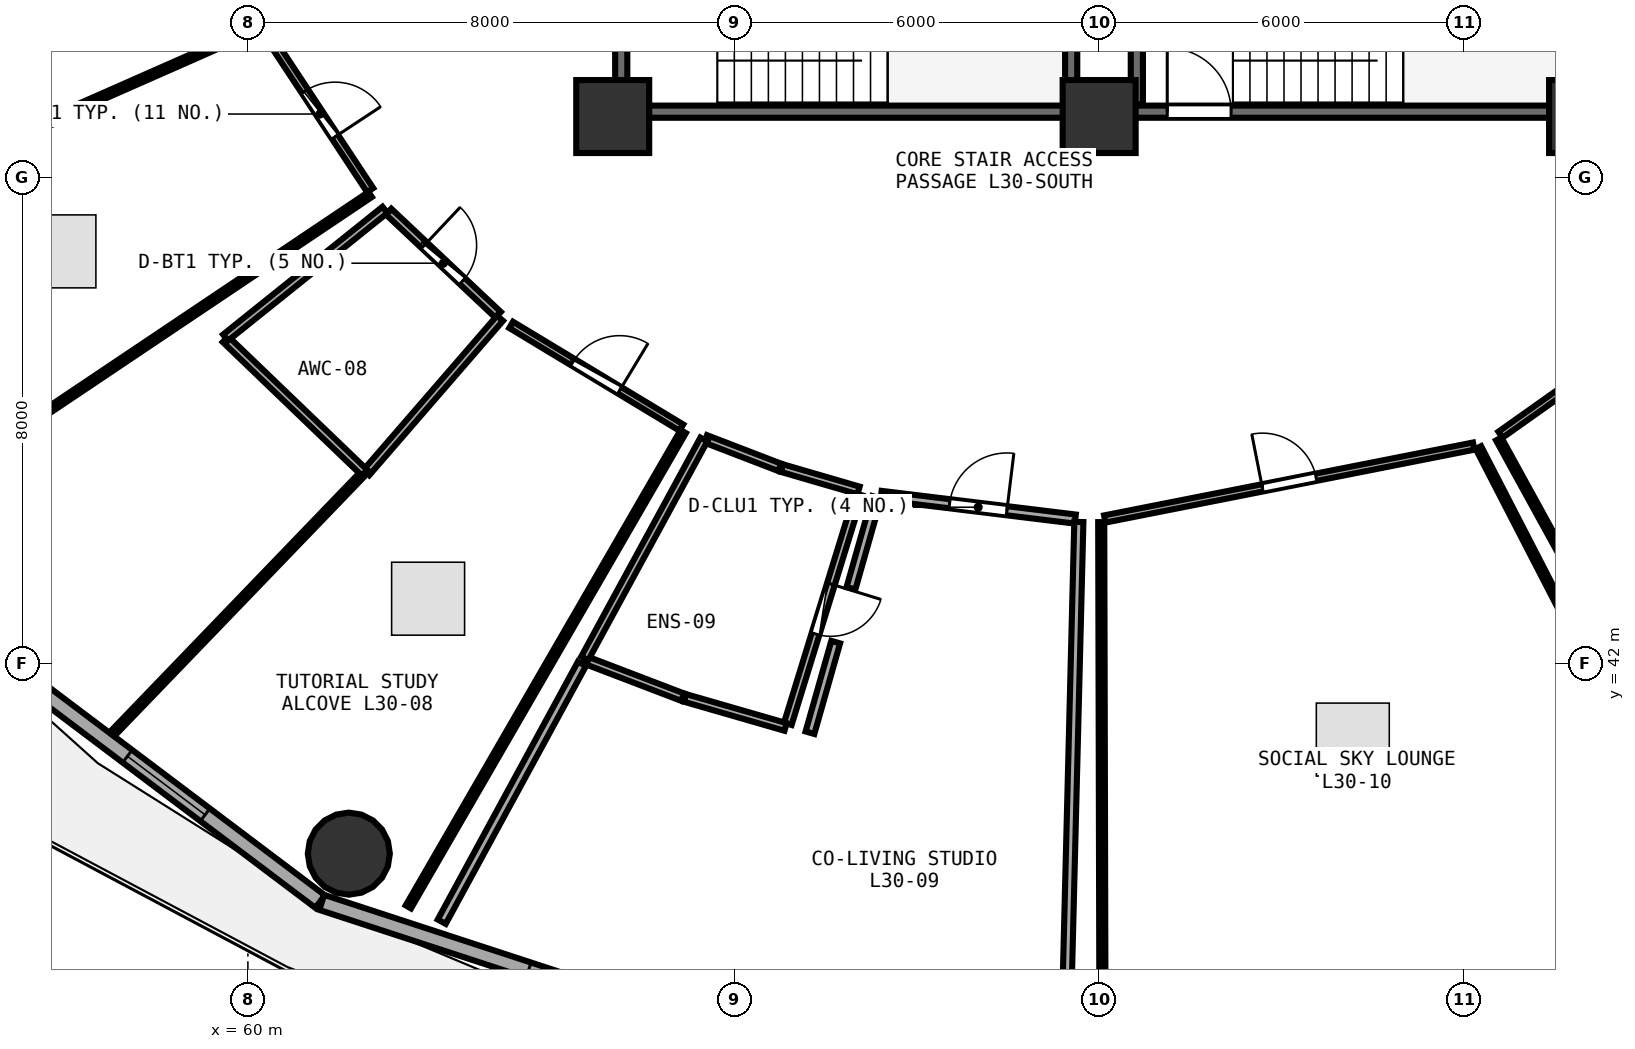
"""IFC4 building model, lengths in metres.
Left out: names, types, materials, properties, quantities, classifications, styles, units other than length and angle.
Written with IfcOpenShell. Run it as: python <this file> out.ifc"""

import sys

from ifc_helpers import new_model, si_unit, direction, frame, frame_2d, origin, origin_2d, place, context, subcontext, project, spatial, rectangle, circle, extrude, element, fill, save


model = new_model("IFC4")
c1 = context("Model", 3, precision=1e-05, world=origin(), true_north=direction((0.0, 1.0)))
c2 = subcontext(c1, "Body", "Model", "MODEL_VIEW")
j1 = project(units=[si_unit("LENGTHUNIT", "METRE"), si_unit("PLANEANGLEUNIT", "RADIAN")], contexts=[c1])
p1 = place(None, origin())
s1 = spatial("IfcSite", under=j1, at=p1, CompositionType="ELEMENT")
p2 = place(p1, origin())
s2 = spatial("IfcBuilding", under=s1, at=p2, CompositionType="ELEMENT")
p3 = place(p2, frame((0.0, 0.0, 117.6)))
s3 = spatial("IfcBuildingStorey", under=s2, at=p3, CompositionType="ELEMENT", Elevation=117.6)
for number, where, z_axis, x_axis in (
    (1, (66.0, 51.0, 0.0), (0.0, 0.0, 1.0), (1.0, 0.0, 0.0)),
    (2, (74.0, 51.0, 0.0), (0.0, 0.0, 1.0), (1.0, 0.0, 0.0)),
    (3, (82.0, 51.0, 0.0), (0.0, 0.0, 1.0), (1.0, 0.0, 0.0)),
):
    element("IfcColumn", number, at=place(p3, frame(where, z_axis=z_axis, x_axis=x_axis)), inside=s3, PredefinedType="PILASTER", context=c2, shape_type="SweptSolid", body=[
        extrude(rectangle(XDim=1.2, YDim=1.2, at=origin_2d()), origin(), (0.0, 0.0, 1.0), 3.75),
    ])
p4 = place(p3, frame((61.66, 38.878, 0.0), z_axis=(0.0, 0.0, 1.0), x_axis=(1.0, 0.0, 0.0)))
e4 = element("IfcColumn", 4, at=p4, inside=s3, PredefinedType="COLUMN", context=c2, shape_type="SweptSolid", body=[
    extrude(circle(Radius=0.675, at=origin_2d()), origin(), (0.0, 0.0, 1.0), 3.75),
])
p5 = place(p3, frame((54.401, 43.207, 0.0), z_axis=(0.0, 0.0, 1.0), x_axis=(0.798501507879, -0.601992808857, 0.0)))
e5 = element("IfcWall", 5, at=p5, inside=s3, PredefinedType="SOLIDWALL", context=c2, shape_type="SweptSolid", body=[
    extrude(rectangle(XDim=8.499, YDim=0.26, at=frame_2d((4.25, 0.0))), origin(), (0.0, 0.0, 1.0), 3.475),
])
p6 = place(p5, frame((4.53, 0.0, 0.85)))
e6 = element("IfcOpeningElement", 6, at=p6, cuts=e5, PredefinedType="OPENING", context=c2, shape_type="SweptSolid", body=[
    extrude(rectangle(XDim=1.6, YDim=1.45, at=frame_2d((0.8, 0.725))), frame((0.0, 0.14, 0.0), z_axis=(0.0, -1.0, 0.0), x_axis=(1.0, 0.0, 0.0)), (0.0, 0.0, 1.0), 0.28),
])
p7 = place(p3, frame((61.214, 38.077, 0.0), z_axis=(0.0, 0.0, 1.0), x_axis=(0.950471101963, -0.310812941064, 0.0)))
e7 = element("IfcWall", 7, at=p7, inside=s3, PredefinedType="SOLIDWALL", context=c2, shape_type="SweptSolid", body=[
    extrude(rectangle(XDim=8.76, YDim=0.26, at=frame_2d((4.38, 0.0))), origin(), (0.0, 0.0, 1.0), 3.475),
])
p8 = place(p7, frame((3.58, 0.0, 0.85)))
e8 = element("IfcOpeningElement", 8, at=p8, cuts=e7, PredefinedType="OPENING", context=c2, shape_type="SweptSolid", body=[
    extrude(rectangle(XDim=1.6, YDim=1.45, at=frame_2d((0.8, 0.725))), frame((0.0, 0.14, 0.0), z_axis=(0.0, -1.0, 0.0), x_axis=(1.0, 0.0, 0.0)), (0.0, 0.0, 1.0), 0.28),
])
p9 = place(p3, frame((74.0, 51.08, 0.0), z_axis=(0.0, 0.0, 1.0), x_axis=(1.0, 0.0, 0.0)))
e9 = element("IfcWall", 9, at=p9, inside=s3, PredefinedType="SHEAR", context=c2, shape_type="SweptSolid", body=[
    extrude(rectangle(XDim=7.9, YDim=0.2, at=frame_2d((3.95, 0.0))), origin(), (0.0, 0.0, 1.0), 3.49),
])
p10 = place(p9, frame((1.12, 0.0, 0.0)))
e10 = element("IfcOpeningElement", 10, at=p10, cuts=e9, PredefinedType="OPENING", context=c2, shape_type="SweptSolid", body=[
    extrude(rectangle(XDim=1.05, YDim=2.1, at=frame_2d((0.525, 1.05))), frame((0.0, 0.11, 0.0), z_axis=(0.0, -1.0, 0.0), x_axis=(1.0, 0.0, 0.0)), (0.0, 0.0, 1.0), 0.22),
])
p11 = place(p3, frame((74.62, 54.27, 0.0), z_axis=(0.0, 0.0, 1.0), x_axis=(0.0, -1.0, 0.0)))
e11 = element("IfcWall", 11, at=p11, inside=s3, PredefinedType="SHEAR", context=c2, shape_type="SweptSolid", body=[
    extrude(rectangle(XDim=3.07, YDim=0.2, at=frame_2d((1.535, 0.0))), origin(), (0.0, 0.0, 1.0), 3.49),
])
p12 = place(p3, frame((66.26, 51.08, 0.0), z_axis=(0.0, 0.0, 1.0), x_axis=(1.0, 0.0, 0.0)))
e12 = element("IfcWall", 12, at=p12, inside=s3, PredefinedType="SHEAR", context=c2, shape_type="SweptSolid", body=[
    extrude(rectangle(XDim=7.16, YDim=0.2, at=frame_2d((3.58, 0.0))), origin(), (0.0, 0.0, 1.0), 3.49),
])
p13 = place(p3, frame((73.54, 51.2, 0.0), z_axis=(0.0, 0.0, 1.0), x_axis=(0.0, 1.0, 0.0)))
e13 = element("IfcWall", 13, at=p13, inside=s3, PredefinedType="SHEAR", context=c2, shape_type="SweptSolid", body=[
    extrude(rectangle(XDim=3.07, YDim=0.2, at=frame_2d((1.535, 0.0))), origin(), (0.0, 0.0, 1.0), 3.49),
])
p14 = place(p3, frame((66.14, 54.27, 0.0), z_axis=(0.0, 0.0, 1.0), x_axis=(0.0, -1.0, 0.0)))
e14 = element("IfcWall", 14, at=p14, inside=s3, PredefinedType="SHEAR", context=c2, shape_type="SweptSolid", body=[
    extrude(rectangle(XDim=3.07, YDim=0.2, at=frame_2d((1.535, 0.0))), origin(), (0.0, 0.0, 1.0), 3.49),
])
p15 = place(p14, frame((1.01, 0.0, 0.0)))
e15 = element("IfcOpeningElement", 15, at=p15, cuts=e14, PredefinedType="OPENING", context=c2, shape_type="SweptSolid", body=[
    extrude(rectangle(XDim=1.05, YDim=2.1, at=frame_2d((0.525, 1.05))), frame((0.0, 0.11, 0.0), z_axis=(0.0, -1.0, 0.0), x_axis=(1.0, 0.0, 0.0)), (0.0, 0.0, 1.0), 0.22),
])
p16 = place(p3, frame((60.358, 52.293, 0.0), z_axis=(0.0, 0.0, 1.0), x_axis=(0.551050840628, -0.834471671804, 0.0)))
e16 = element("IfcWall", 16, at=p16, inside=s3, PredefinedType="PARTITIONING", context=c2, shape_type="SweptSolid", body=[
    extrude(rectangle(XDim=3.0, YDim=0.12, at=frame_2d((1.5, 0.0))), origin(), (0.0, 0.0, 1.0), 2.925),
])
p17 = place(p16, frame((1.05, 0.0, 0.0)))
e17 = element("IfcOpeningElement", 17, at=p17, cuts=e16, PredefinedType="OPENING", context=c2, shape_type="SweptSolid", body=[
    extrude(rectangle(XDim=0.9, YDim=2.08, at=frame_2d((0.45, 1.04))), frame((0.0, 0.07, 0.0), z_axis=(0.0, -1.0, 0.0), x_axis=(1.0, 0.0, 0.0)), (0.0, 0.0, 1.0), 0.14),
])
p18 = place(p3, frame((62.314, 49.437, 0.0), z_axis=(0.0, 0.0, 1.0), x_axis=(0.727704720547, -0.68589054498, 0.0)))
e18 = element("IfcWall", 18, at=p18, inside=s3, PredefinedType="PLUMBINGWALL", context=c2, shape_type="SweptSolid", body=[
    extrude(rectangle(XDim=2.476, YDim=0.13, at=frame_2d((1.238, 0.0))), origin(), (0.0, 0.0, 1.0), 2.925),
])
p19 = place(p18, frame((0.808, 0.0, 0.0)))
e19 = element("IfcOpeningElement", 19, at=p19, cuts=e18, PredefinedType="OPENING", context=c2, shape_type="SweptSolid", body=[
    extrude(rectangle(XDim=0.86, YDim=2.05, at=frame_2d((0.43, 1.025))), frame((0.0, 0.075, 0.0), z_axis=(0.0, -1.0, 0.0), x_axis=(1.0, 0.0, 0.0)), (0.0, 0.0, 1.0), 0.15),
])
p20 = place(p3, frame((64.329, 47.574, 0.0), z_axis=(0.0, 0.0, 1.0), x_axis=(0.8562252486, -0.516602674848, 0.0)))
e20 = element("IfcWall", 20, at=p20, inside=s3, PredefinedType="PARTITIONING", context=c2, shape_type="SweptSolid", body=[
    extrude(rectangle(XDim=3.269, YDim=0.12, at=frame_2d((1.635, 0.0))), origin(), (0.0, 0.0, 1.0), 2.925),
])
p21 = place(p20, frame((1.185, 0.0, 0.0)))
e21 = element("IfcOpeningElement", 21, at=p21, cuts=e20, PredefinedType="OPENING", context=c2, shape_type="SweptSolid", body=[
    extrude(rectangle(XDim=0.9, YDim=2.08, at=frame_2d((0.45, 1.04))), frame((0.0, 0.07, 0.0), z_axis=(0.0, -1.0, 0.0), x_axis=(1.0, 0.0, 0.0)), (0.0, 0.0, 1.0), 0.14),
])
p22 = place(p3, frame((70.044, 44.789, 0.0), z_axis=(0.0, 0.0, 1.0), x_axis=(-0.294737077858, -0.955578387646, 0.0)))
e22 = element("IfcWall", 22, at=p22, inside=s3, PredefinedType="PLUMBINGWALL", context=c2, shape_type="SweptSolid", body=[
    extrude(rectangle(XDim=3.951, YDim=0.13, at=frame_2d((1.976, 0.0))), origin(), (0.0, 0.0, 1.0), 3.175),
])
p23 = place(p22, frame((1.545, 0.0, 0.0)))
e23 = element("IfcOpeningElement", 23, at=p23, cuts=e22, PredefinedType="OPENING", context=c2, shape_type="SweptSolid", body=[
    extrude(rectangle(XDim=0.86, YDim=2.05, at=frame_2d((0.43, 1.025))), frame((0.0, 0.075, 0.0), z_axis=(0.0, -1.0, 0.0), x_axis=(1.0, 0.0, 0.0)), (0.0, 0.0, 1.0), 0.15),
])
p24 = place(p3, frame((70.414, 44.77, 0.0), z_axis=(0.0, 0.0, 1.0), x_axis=(0.992649213004, -0.12102702146, 0.0)))
e24 = element("IfcWall", 24, at=p24, inside=s3, PredefinedType="PARTITIONING", context=c2, shape_type="SweptSolid", body=[
    extrude(rectangle(XDim=3.218, YDim=0.15, at=frame_2d((1.609, 0.0))), origin(), (0.0, 0.0, 1.0), 3.48),
])
p25 = place(p24, frame((1.134, 0.0, 0.0)))
e25 = element("IfcOpeningElement", 25, at=p25, cuts=e24, PredefinedType="OPENING", context=c2, shape_type="SweptSolid", body=[
    extrude(rectangle(XDim=0.95, YDim=2.08, at=frame_2d((0.475, 1.04))), frame((0.0, 0.085, 0.0), z_axis=(0.0, -1.0, 0.0), x_axis=(1.0, 0.0, 0.0)), (0.0, 0.0, 1.0), 0.17),
])
p26 = place(p3, frame((74.093, 44.382, 0.0), z_axis=(0.0, 0.0, 1.0), x_axis=(0.981035031673, 0.193830510061, 0.0)))
e26 = element("IfcWall", 26, at=p26, inside=s3, PredefinedType="PARTITIONING", context=c2, shape_type="SweptSolid", body=[
    extrude(rectangle(XDim=6.184, YDim=0.12, at=frame_2d((3.092, 0.0))), origin(), (0.0, 0.0, 1.0), 3.235),
])
p27 = place(p26, frame((2.642, 0.0, 0.0)))
e27 = element("IfcOpeningElement", 27, at=p27, cuts=e26, PredefinedType="OPENING", context=c2, shape_type="SweptSolid", body=[
    extrude(rectangle(XDim=0.9, YDim=2.08, at=frame_2d((0.45, 1.04))), frame((0.0, 0.07, 0.0), z_axis=(0.0, -1.0, 0.0), x_axis=(1.0, 0.0, 0.0)), (0.0, 0.0, 1.0), 0.14),
])
p28 = place(p3, frame((80.601, 45.768, 0.0), z_axis=(0.0, 0.0, 1.0), x_axis=(0.815932399176, 0.578147316846, 0.0)))
e28 = element("IfcWall", 28, at=p28, inside=s3, PredefinedType="PARTITIONING", context=c2, shape_type="SweptSolid", body=[
    extrude(rectangle(XDim=5.993, YDim=0.12, at=frame_2d((2.997, 0.0))), origin(), (0.0, 0.0, 1.0), 2.925),
])
p29 = place(p28, frame((2.546, 0.0, 0.0)))
e29 = element("IfcOpeningElement", 29, at=p29, cuts=e28, PredefinedType="OPENING", context=c2, shape_type="SweptSolid", body=[
    extrude(rectangle(XDim=0.9, YDim=2.08, at=frame_2d((0.45, 1.04))), frame((0.0, 0.07, 0.0), z_axis=(0.0, -1.0, 0.0), x_axis=(1.0, 0.0, 0.0)), (0.0, 0.0, 1.0), 0.14),
])
p30 = place(p3, frame((60.213, 52.479, 0.0), z_axis=(0.0, 0.0, 1.0), x_axis=(-0.914847920866, -0.403798565732, 0.0)))
e30 = element("IfcWall", 30, at=p30, inside=s3, PredefinedType="PARTITIONING", context=c2, shape_type="SweptSolid", body=[
    extrude(rectangle(XDim=3.719, YDim=0.1, at=frame_2d((1.86, 0.0))), origin(), (0.0, 0.0, 1.0), 3.175),
])
p31 = place(p3, frame((56.76, 50.999, 0.0), z_axis=(0.0, 0.0, 1.0), x_axis=(-0.338198726163, 0.94107471628, 0.0)))
e31 = element("IfcWall", 31, at=p31, inside=s3, PredefinedType="PARTITIONING", context=c2, shape_type="SweptSolid", body=[
    extrude(rectangle(XDim=3.238, YDim=0.1, at=frame_2d((1.619, 0.0))), origin(), (0.0, 0.0, 1.0), 3.175),
])
p32 = place(p3, frame((62.011, 49.718, 0.0), z_axis=(0.0, 0.0, 1.0), x_axis=(-0.830433607217, -0.557117603388, 0.0)))
e32 = element("IfcWall", 32, at=p32, inside=s3, PredefinedType="PARTITIONING", context=c2, shape_type="SweptSolid", body=[
    extrude(rectangle(XDim=9.546, YDim=0.1, at=frame_2d((4.773, 0.0))), origin(), (0.0, 0.0, 1.0), 2.975),
])
p33 = place(p3, frame((51.219, 48.685, 0.0), z_axis=(0.0, 0.0, 1.0), x_axis=(0.927926926295, 0.372762148637, 0.0)))
e33 = element("IfcWall", 33, at=p33, inside=s3, PredefinedType="PARTITIONING", context=c2, shape_type="SweptSolid", body=[
    extrude(rectangle(XDim=6.044, YDim=0.1, at=frame_2d((3.022, 0.0))), origin(), (0.0, 0.0, 1.0), 2.925),
])
p34 = place(p3, frame((64.146, 47.683, 0.0), z_axis=(0.0, 0.0, 1.0), x_axis=(-0.654725816563, -0.75586645985, 0.0)))
e34 = element("IfcWall", 34, at=p34, inside=s3, PredefinedType="PLUMBINGWALL", context=c2, shape_type="SweptSolid", body=[
    extrude(rectangle(XDim=3.36, YDim=0.13, at=frame_2d((1.68, 0.0))), origin(), (0.0, 0.0, 1.0), 3.235),
])
p35 = place(p3, frame((61.919, 45.142, 0.0), z_axis=(0.0, 0.0, 1.0), x_axis=(-0.721319622767, 0.692602340316, 0.0)))
e35 = element("IfcWall", 35, at=p35, inside=s3, PredefinedType="PLUMBINGWALL", context=c2, shape_type="SweptSolid", body=[
    extrude(rectangle(XDim=3.171, YDim=0.13, at=frame_2d((1.585, 0.0))), origin(), (0.0, 0.0, 1.0), 2.925),
])
p36 = place(p3, frame((59.633, 47.365, 0.0), z_axis=(0.0, 0.0, 1.0), x_axis=(0.780343931947, 0.625350579974, 0.0)))
e36 = element("IfcWall", 36, at=p36, inside=s3, PredefinedType="PLUMBINGWALL", context=c2, shape_type="SweptSolid", body=[
    extrude(rectangle(XDim=3.36, YDim=0.13, at=frame_2d((1.68, 0.0))), origin(), (0.0, 0.0, 1.0), 3.235),
])
p37 = place(p3, frame((67.16, 45.819, 0.0), z_axis=(0.0, 0.0, 1.0), x_axis=(-0.500668535271, -0.865639080558, 0.0)))
e37 = element("IfcWall", 37, at=p37, inside=s3, PredefinedType="PARTITIONING", context=c2, shape_type="SweptSolid", body=[
    extrude(rectangle(XDim=9.03, YDim=0.1, at=frame_2d((4.515, 0.0))), origin(), (0.0, 0.0, 1.0), 2.925),
])
p38 = place(p3, frame((57.806, 40.885, 0.0), z_axis=(0.0, 0.0, 1.0), x_axis=(0.693697879067, 0.720266098451, 0.0)))
e38 = element("IfcWall", 38, at=p38, inside=s3, PredefinedType="PARTITIONING", context=c2, shape_type="SweptSolid", body=[
    extrude(rectangle(XDim=5.844, YDim=0.1, at=frame_2d((2.922, 0.0))), origin(), (0.0, 0.0, 1.0), 2.975),
])
p39 = place(p3, frame((67.528, 45.7, 0.0), z_axis=(0.0, 0.0, 1.0), x_axis=(0.933311844858, -0.359066846488, 0.0)))
e39 = element("IfcWall", 39, at=p39, inside=s3, PredefinedType="PLUMBINGWALL", context=c2, shape_type="SweptSolid", body=[
    extrude(rectangle(XDim=1.305, YDim=0.13, at=frame_2d((0.652, 0.0))), origin(), (0.0, 0.0, 1.0), 2.925),
])
p40 = place(p3, frame((68.783, 45.219, 0.0), z_axis=(0.0, 0.0, 1.0), x_axis=(0.960085412009, -0.279706992489, 0.0)))
e40 = element("IfcWall", 40, at=p40, inside=s3, PredefinedType="PLUMBINGWALL", context=c2, shape_type="SweptSolid", body=[
    extrude(rectangle(XDim=1.312, YDim=0.13, at=frame_2d((0.656, 0.0))), origin(), (0.0, 0.0, 1.0), 3.48),
])
p41 = place(p3, frame((68.843, 40.961, 0.0), z_axis=(0.0, 0.0, 1.0), x_axis=(-0.960750273448, 0.277414693321, 0.0)))
e41 = element("IfcWall", 41, at=p41, inside=s3, PredefinedType="PLUMBINGWALL", context=c2, shape_type="SweptSolid", body=[
    extrude(rectangle(XDim=1.723, YDim=0.13, at=frame_2d((0.862, 0.0))), origin(), (0.0, 0.0, 1.0), 2.925),
])
p42 = place(p3, frame((67.149, 41.452, 0.0), z_axis=(0.0, 0.0, 1.0), x_axis=(-0.934103540356, 0.357002207127, 0.0)))
e42 = element("IfcWall", 42, at=p42, inside=s3, PredefinedType="PLUMBINGWALL", context=c2, shape_type="SweptSolid", body=[
    extrude(rectangle(XDim=1.714, YDim=0.13, at=frame_2d((0.857, 0.0))), origin(), (0.0, 0.0, 1.0), 3.48),
])
p43 = place(p3, frame((65.54, 42.089, 0.0), z_axis=(0.0, 0.0, 1.0), x_axis=(0.478075883312, 0.878318535496, 0.0)))
e43 = element("IfcWall", 43, at=p43, inside=s3, PredefinedType="PLUMBINGWALL", context=c2, shape_type="SweptSolid", body=[
    extrude(rectangle(XDim=4.1, YDim=0.13, at=frame_2d((2.05, 0.0))), origin(), (0.0, 0.0, 1.0), 2.925),
])
p44 = place(p3, frame((73.666, 44.333, 0.0), z_axis=(0.0, 0.0, 1.0), x_axis=(-0.025193894125, -0.999682583473, 0.0)))
e44 = element("IfcWall", 44, at=p44, inside=s3, PredefinedType="PARTITIONING", context=c2, shape_type="SweptSolid", body=[
    extrude(rectangle(XDim=8.77, YDim=0.15, at=frame_2d((4.385, 0.0))), origin(), (0.0, 0.0, 1.0), 2.975),
])
p45 = place(p3, frame((63.188, 37.759, 0.0), z_axis=(0.0, 0.0, 1.0), x_axis=(0.477678819353, 0.878534544307, 0.0)))
e45 = element("IfcWall", 45, at=p45, inside=s3, PredefinedType="PARTITIONING", context=c2, shape_type="SweptSolid", body=[
    extrude(rectangle(XDim=4.827, YDim=0.15, at=frame_2d((2.414, 0.0))), origin(), (0.0, 0.0, 1.0), 2.975),
])
p46 = place(p3, frame((69.244, 40.866, 0.0), z_axis=(0.0, 0.0, 1.0), x_axis=(0.273076599945, 0.961992292361, 0.0)))
e46 = element("IfcWall", 46, at=p46, inside=s3, PredefinedType="PARTITIONING", context=c2, shape_type="SweptSolid", body=[
    extrude(rectangle(XDim=1.549, YDim=0.15, at=frame_2d((0.775, 0.0))), origin(), (0.0, 0.0, 1.0), 3.175),
])
p47 = place(p3, frame((69.918, 43.242, 0.0), z_axis=(0.0, 0.0, 1.0), x_axis=(0.273103794408, 0.961984572371, 0.0)))
e47 = element("IfcWall", 47, at=p47, inside=s3, PredefinedType="PARTITIONING", context=c2, shape_type="SweptSolid", body=[
    extrude(rectangle(XDim=1.555, YDim=0.15, at=frame_2d((0.778, 0.0))), origin(), (0.0, 0.0, 1.0), 3.48),
])
p48 = place(p3, frame((80.237, 45.556, 0.0), z_axis=(0.0, 0.0, 1.0), x_axis=(0.458694817529, -0.888593869196, 0.0)))
e48 = element("IfcWall", 48, at=p48, inside=s3, PredefinedType="PARTITIONING", context=c2, shape_type="SweptSolid", body=[
    extrude(rectangle(XDim=8.987, YDim=0.1, at=frame_2d((4.494, 0.0))), origin(), (0.0, 0.0, 1.0), 2.925),
])
p49 = place(p3, frame((74.056, 35.56, 0.0), z_axis=(0.0, 0.0, 1.0), x_axis=(-0.00247758273, 0.999996930787, 0.0)))
e49 = element("IfcWall", 49, at=p49, inside=s3, PredefinedType="PARTITIONING", context=c2, shape_type="SweptSolid", body=[
    extrude(rectangle(XDim=8.77, YDim=0.1, at=frame_2d((4.385, 0.0))), origin(), (0.0, 0.0, 1.0), 2.975),
])
p50 = place(p3, frame((84.913, 37.803, 0.0), z_axis=(0.0, 0.0, 1.0), x_axis=(-0.481837612944, 0.876260529039, 0.0)))
e50 = element("IfcWall", 50, at=p50, inside=s3, PredefinedType="PARTITIONING", context=c2, shape_type="SweptSolid", body=[
    extrude(rectangle(XDim=9.01, YDim=0.1, at=frame_2d((4.505, 0.0))), origin(), (0.0, 0.0, 1.0), 2.925),
])
p51 = place(p6, origin())
e51 = element("IfcWindow", 51, at=p51, inside=s3, PartitioningType="SINGLE_PANEL", PredefinedType="WINDOW", context=c2, shape_type="SweptSolid", body=[
    extrude(rectangle(XDim=1.6, YDim=1.45, at=frame_2d((0.8, 0.725))), frame((0.0, 0.03, 0.0), z_axis=(0.0, -1.0, 0.0), x_axis=(1.0, 0.0, 0.0)), (0.0, 0.0, 1.0), 0.06),
])
fill(e6, e51)
p52 = place(p8, origin())
e52 = element("IfcWindow", 52, at=p52, inside=s3, PartitioningType="SINGLE_PANEL", PredefinedType="WINDOW", context=c2, shape_type="SweptSolid", body=[
    extrude(rectangle(XDim=1.6, YDim=1.45, at=frame_2d((0.8, 0.725))), frame((0.0, 0.03, 0.0), z_axis=(0.0, -1.0, 0.0), x_axis=(1.0, 0.0, 0.0)), (0.0, 0.0, 1.0), 0.06),
])
fill(e8, e52)
p53 = place(p10, origin())
e53 = element("IfcDoor", 53, at=p53, inside=s3, OperationType="SINGLE_SWING_LEFT", PredefinedType="DOOR", context=c2, shape_type="SweptSolid", body=[
    extrude(rectangle(XDim=1.05, YDim=2.1, at=frame_2d((0.525, 1.05))), frame((0.0, 0.025, 0.0), z_axis=(0.0, -1.0, 0.0), x_axis=(1.0, 0.0, 0.0)), (0.0, 0.0, 1.0), 0.05),
])
fill(e10, e53)
p54 = place(p17, origin())
e54 = element("IfcDoor", 54, at=p54, inside=s3, OperationType="SINGLE_SWING_RIGHT", PredefinedType="DOOR", context=c2, shape_type="SweptSolid", body=[
    extrude(rectangle(XDim=0.9, YDim=2.08, at=frame_2d((0.45, 1.04))), frame((0.0, 0.025, 0.0), z_axis=(0.0, -1.0, 0.0), x_axis=(1.0, 0.0, 0.0)), (0.0, 0.0, 1.0), 0.05),
])
fill(e17, e54)
p55 = place(p19, origin())
e55 = element("IfcDoor", 55, at=p55, inside=s3, OperationType="SINGLE_SWING_LEFT", PredefinedType="DOOR", context=c2, shape_type="SweptSolid", body=[
    extrude(rectangle(XDim=0.86, YDim=2.05, at=frame_2d((0.43, 1.025))), frame((0.0, 0.025, 0.0), z_axis=(0.0, -1.0, 0.0), x_axis=(1.0, 0.0, 0.0)), (0.0, 0.0, 1.0), 0.05),
])
fill(e19, e55)
p56 = place(p21, origin())
e56 = element("IfcDoor", 56, at=p56, inside=s3, OperationType="SINGLE_SWING_RIGHT", PredefinedType="DOOR", context=c2, shape_type="SweptSolid", body=[
    extrude(rectangle(XDim=0.9, YDim=2.08, at=frame_2d((0.45, 1.04))), frame((0.0, 0.025, 0.0), z_axis=(0.0, -1.0, 0.0), x_axis=(1.0, 0.0, 0.0)), (0.0, 0.0, 1.0), 0.05),
])
fill(e21, e56)
p57 = place(p23, origin())
e57 = element("IfcDoor", 57, at=p57, inside=s3, OperationType="SINGLE_SWING_LEFT", PredefinedType="DOOR", context=c2, shape_type="SweptSolid", body=[
    extrude(rectangle(XDim=0.86, YDim=2.05, at=frame_2d((0.43, 1.025))), frame((0.0, 0.025, 0.0), z_axis=(0.0, -1.0, 0.0), x_axis=(1.0, 0.0, 0.0)), (0.0, 0.0, 1.0), 0.05),
])
fill(e23, e57)
p58 = place(p25, origin())
e58 = element("IfcDoor", 58, at=p58, inside=s3, OperationType="SINGLE_SWING_RIGHT", PredefinedType="DOOR", context=c2, shape_type="SweptSolid", body=[
    extrude(rectangle(XDim=0.95, YDim=2.08, at=frame_2d((0.475, 1.04))), frame((0.0, 0.025, 0.0), z_axis=(0.0, -1.0, 0.0), x_axis=(1.0, 0.0, 0.0)), (0.0, 0.0, 1.0), 0.05),
])
fill(e25, e58)
p59 = place(p27, origin())
e59 = element("IfcDoor", 59, at=p59, inside=s3, OperationType="SINGLE_SWING_LEFT", PredefinedType="DOOR", context=c2, shape_type="SweptSolid", body=[
    extrude(rectangle(XDim=0.9, YDim=2.08, at=frame_2d((0.45, 1.04))), frame((0.0, 0.025, 0.0), z_axis=(0.0, -1.0, 0.0), x_axis=(1.0, 0.0, 0.0)), (0.0, 0.0, 1.0), 0.05),
])
fill(e27, e59)
save(model, sys.argv[1])
